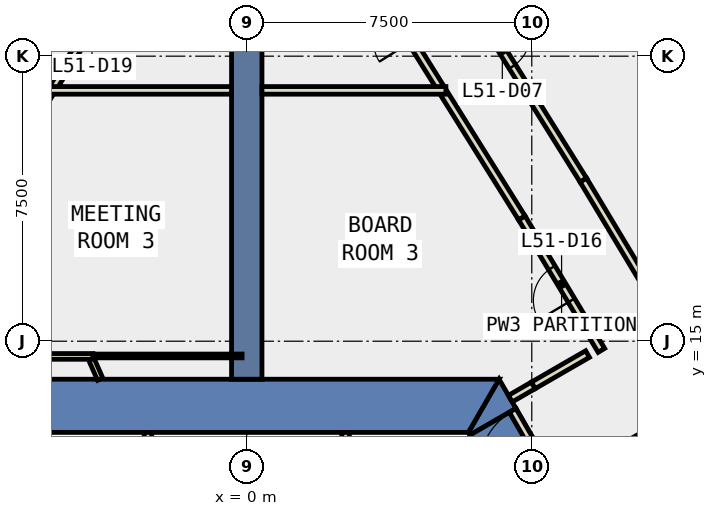
"""IFC4 building model, lengths in metres.
Left out: names, types, materials, properties, quantities, classifications, styles, units other than length and angle.
Written with IfcOpenShell. Run it as: python <this file> out.ifc"""

import sys

from ifc_helpers import new_model, si_unit, direction, frame, frame_2d, origin, place, context, subcontext, project, spatial, polyline, rectangle, outline, extrude, element, fill, save


model = new_model("IFC4")
c1 = context("Model", 3, precision=1e-05, world=origin(), true_north=direction((0.0, 1.0)))
c2 = subcontext(c1, "Body", "Model", "MODEL_VIEW")
j1 = project(units=[si_unit("LENGTHUNIT", "METRE"), si_unit("PLANEANGLEUNIT", "RADIAN")], contexts=[c1])
p1 = place(None, origin())
s1 = spatial("IfcSite", under=j1, at=p1, CompositionType="ELEMENT")
p2 = place(p1, origin())
s2 = spatial("IfcBuilding", under=s1, at=p2, CompositionType="ELEMENT")
p3 = place(p2, frame((0.0, 0.0, 227.6)))
s3 = spatial("IfcBuildingStorey", under=s2, at=p3, CompositionType="ELEMENT", Elevation=227.6)
p4 = place(p3, frame((0.0, 0.0, -0.4)))
e1 = element("IfcWall", 1, at=p4, inside=s3, PredefinedType="SHEAR", context=c2, shape_type="SweptSolid", body=[
    extrude(outline(polyline([(5.871, 12.53), (7.084, 13.23), (6.64, 14.0), (5.831, 12.6), (5.871, 12.53)])), origin(), (0.0, 0.0, 1.0), 4.2),
])
p5 = place(p3, frame((0.0, 0.0, 3.6)))
e2 = element("IfcWall", 2, at=p5, inside=s3, PredefinedType="SHEAR", context=c2, shape_type="SweptSolid", body=[
    extrude(outline(polyline([(7.084, 13.23), (5.871, 12.53), (6.871, 10.798), (8.084, 11.498), (7.084, 13.23)])), origin(), (0.0, 0.0, 1.0), 0.2),
])
p6 = place(p3, frame((0.0, 0.0, -0.4)))
e3 = element("IfcWall", 3, at=p6, inside=s3, PredefinedType="SHEAR", context=c2, shape_type="SweptSolid", body=[
    extrude(outline(polyline([(6.64, 14.0), (-6.64, 14.0), (-5.831, 12.6), (5.831, 12.6), (6.64, 14.0)])), origin(), (0.0, 0.0, 1.0), 4.2),
])
p7 = place(p3, frame((0.0, 14.0, -0.4), z_axis=(0.0, 0.0, 1.0), x_axis=(0.0, 1.0, 0.0)))
e4 = element("IfcWall", 4, at=p7, inside=s3, PredefinedType="SHEAR", context=c2, shape_type="SweptSolid", body=[
    extrude(rectangle(XDim=9.0, YDim=0.8, at=frame_2d((4.5, 0.0))), origin(), (0.0, 0.0, 1.0), 4.2),
])
p8 = place(p3, frame((13.41, 22.614, 0.0), z_axis=(0.0, 0.0, 1.0), x_axis=(-0.530037467052, 0.847974223383, 0.0)))
e5 = element("IfcWall", 5, at=p8, inside=s3, PredefinedType="STANDARD", context=c2, shape_type="SweptSolid", body=[
    extrude(rectangle(XDim=7.405, YDim=0.3, at=frame_2d((3.702, 0.0))), origin(), (0.0, 0.0, 1.0), 3.8),
])
p9 = place(p8, frame((0.651, 0.0, 0.9)))
e6 = element("IfcOpeningElement", 6, at=p9, cuts=e5, PredefinedType="OPENING", context=c2, shape_type="SweptSolid", body=[
    extrude(rectangle(XDim=2.4, YDim=2.6, at=frame_2d((1.2, 1.3))), frame((0.0, 0.16, 0.0), z_axis=(0.0, -1.0, 0.0), x_axis=(1.0, 0.0, 0.0)), (0.0, 0.0, 1.0), 0.32),
])
p10 = place(p8, frame((4.354, 0.0, 0.9)))
e7 = element("IfcOpeningElement", 7, at=p10, cuts=e5, PredefinedType="OPENING", context=c2, shape_type="SweptSolid", body=[
    extrude(rectangle(XDim=2.4, YDim=2.6, at=frame_2d((1.2, 1.3))), frame((0.0, 0.16, 0.0), z_axis=(0.0, -1.0, 0.0), x_axis=(1.0, 0.0, 0.0)), (0.0, 0.0, 1.0), 0.32),
])
p11 = place(p3, frame((10.706, 12.666, 0.0), z_axis=(0.0, 0.0, 1.0), x_axis=(-0.865862892194, -0.50028137275, 0.0)))
e8 = element("IfcWall", 8, at=p11, inside=s3, PredefinedType="PARTITIONING", context=c2, shape_type="SweptSolid", body=[
    extrude(rectangle(XDim=2.155, YDim=0.2, at=frame_2d((1.078, 0.0))), origin(), (0.0, 0.0, 1.0), 3.8),
])
p12 = place(p3, frame((6.935, 13.488, 0.0), z_axis=(0.0, 0.0, 1.0), x_axis=(0.866022890907, 0.500004352405, 0.0)))
e9 = element("IfcWall", 9, at=p12, inside=s3, PredefinedType="PARTITIONING", context=c2, shape_type="SweptSolid", body=[
    extrude(rectangle(XDim=0.7, YDim=0.2, at=frame_2d((0.35, 0.0))), origin(), (0.0, 0.0, 1.0), 2.4),
])
p13 = place(p3, frame((9.332, 14.759, 0.0), z_axis=(0.0, 0.0, 1.0), x_axis=(-0.514989912292, 0.857196237881, 0.0)))
e10 = element("IfcWall", 10, at=p13, inside=s3, PredefinedType="PARTITIONING", context=c2, shape_type="SweptSolid", body=[
    extrude(rectangle(XDim=4.068, YDim=0.2, at=frame_2d((2.034, 0.0))), origin(), (0.0, 0.0, 1.0), 3.8),
])
p14 = place(p13, frame((1.534, 0.0, 0.0)))
e11 = element("IfcOpeningElement", 11, at=p14, cuts=e10, PredefinedType="OPENING", context=c2, shape_type="SweptSolid", body=[
    extrude(rectangle(XDim=1.0, YDim=2.1, at=frame_2d((0.5, 1.05))), frame((0.0, 0.11, 0.0), z_axis=(0.0, -1.0, 0.0), x_axis=(1.0, 0.0, 0.0)), (0.0, 0.0, 1.0), 0.22),
])
for number, where, z_axis, x_axis in (
    (12, (7.237, 18.246, 0.0), (0.0, 0.0, 1.0), (-0.53, 0.848, 0.0)),
    (13, (-5.193, 21.515, 0.0), (0.0, 0.0, 1.0), (-0.53, -0.848, 0.0)),
):
    element("IfcWall", number, at=place(p3, frame(where, z_axis=z_axis, x_axis=x_axis)), inside=s3, PredefinedType="PARTITIONING", context=c2, shape_type="SweptSolid", body=[
        extrude(rectangle(XDim=3.855, YDim=0.2, at=frame_2d((1.928, 0.0))), origin(), (0.0, 0.0, 1.0), 3.8),
    ])
p15 = place(p3, frame((5.087, 21.685, 0.0), z_axis=(0.0, 0.0, 1.0), x_axis=(-0.529998940003, 0.847998304005, 0.0)))
e14 = element("IfcWall", 14, at=p15, inside=s3, PredefinedType="PARTITIONING", context=c2, shape_type="SweptSolid", body=[
    extrude(rectangle(XDim=3.83, YDim=0.2, at=frame_2d((1.915, 0.0))), origin(), (0.0, 0.0, 1.0), 3.8),
])
p16 = place(p15, frame((1.416, 0.0, 0.0)))
e15 = element("IfcOpeningElement", 15, at=p16, cuts=e14, PredefinedType="OPENING", context=c2, shape_type="SweptSolid", body=[
    extrude(rectangle(XDim=1.0, YDim=2.1, at=frame_2d((0.5, 1.05))), frame((0.0, 0.11, 0.0), z_axis=(0.0, -1.0, 0.0), x_axis=(1.0, 0.0, 0.0)), (0.0, 0.0, 1.0), 0.22),
])
p17 = place(p3, frame((-3.057, 24.933, 0.0), z_axis=(0.0, 0.0, 1.0), x_axis=(-0.529998940003, -0.847998304005, 0.0)))
e16 = element("IfcWall", 16, at=p17, inside=s3, PredefinedType="PARTITIONING", context=c2, shape_type="SweptSolid", body=[
    extrude(rectangle(XDim=3.83, YDim=0.2, at=frame_2d((1.915, 0.0))), origin(), (0.0, 0.0, 1.0), 3.8),
])
p18 = place(p17, frame((1.416, 0.0, 0.0)))
e17 = element("IfcOpeningElement", 17, at=p18, cuts=e16, PredefinedType="OPENING", context=c2, shape_type="SweptSolid", body=[
    extrude(rectangle(XDim=1.0, YDim=2.1, at=frame_2d((0.5, 1.05))), frame((0.0, 0.11, 0.0), z_axis=(0.0, -1.0, 0.0), x_axis=(1.0, 0.0, 0.0)), (0.0, 0.0, 1.0), 0.22),
])
p19 = place(p3, frame((4.593, 26.061, 0.0), z_axis=(0.0, 0.0, 1.0), x_axis=(0.530012579093, -0.847989779421, 0.0)))
e18 = element("IfcWall", 18, at=p19, inside=s3, PredefinedType="PARTITIONING", context=c2, shape_type="SweptSolid", body=[
    extrude(rectangle(XDim=8.045, YDim=0.2, at=frame_2d((4.022, 0.0))), origin(), (0.0, 0.0, 1.0), 3.8),
])
p20 = place(p19, frame((3.522, 0.0, 0.0)))
e19 = element("IfcOpeningElement", 19, at=p20, cuts=e18, PredefinedType="OPENING", context=c2, shape_type="SweptSolid", body=[
    extrude(rectangle(XDim=1.0, YDim=2.1, at=frame_2d((0.5, 1.05))), frame((0.0, 0.11, 0.0), z_axis=(0.0, -1.0, 0.0), x_axis=(1.0, 0.0, 0.0)), (0.0, 0.0, 1.0), 0.22),
])
p21 = place(p3, frame((8.857, 19.239, 0.0), z_axis=(0.0, 0.0, 1.0), x_axis=(0.514953174362, -0.857218308376, 0.0)))
e20 = element("IfcWall", 20, at=p21, inside=s3, PredefinedType="PARTITIONING", context=c2, shape_type="SweptSolid", body=[
    extrude(rectangle(XDim=4.002, YDim=0.2, at=frame_2d((2.001, 0.0))), origin(), (0.0, 0.0, 1.0), 3.8),
])
p22 = place(p3, frame((-8.896, 19.176, 0.0), z_axis=(0.0, 0.0, 1.0), x_axis=(0.529985425286, 0.848006750553, 0.0)))
e21 = element("IfcWall", 21, at=p22, inside=s3, PredefinedType="PARTITIONING", context=c2, shape_type="SweptSolid", body=[
    extrude(rectangle(XDim=8.119, YDim=0.2, at=frame_2d((4.06, 0.0))), origin(), (0.0, 0.0, 1.0), 3.8),
])
p23 = place(p22, frame((3.56, 0.0, 0.0)))
e22 = element("IfcOpeningElement", 22, at=p23, cuts=e21, PredefinedType="OPENING", context=c2, shape_type="SweptSolid", body=[
    extrude(rectangle(XDim=1.0, YDim=2.1, at=frame_2d((0.5, 1.05))), frame((0.0, 0.11, 0.0), z_axis=(0.0, -1.0, 0.0), x_axis=(1.0, 0.0, 0.0)), (0.0, 0.0, 1.0), 0.22),
])
p24 = place(p3, frame((-2.6, 10.8, 0.0), z_axis=(0.0, 0.0, 1.0), x_axis=(0.0, 1.0, 0.0)))
e23 = element("IfcWall", 23, at=p24, inside=s3, PredefinedType="PARTITIONING", context=c2, shape_type="SweptSolid", body=[
    extrude(rectangle(XDim=1.8, YDim=0.2, at=frame_2d((0.9, 0.0))), origin(), (0.0, 0.0, 1.0), 3.8),
])
p25 = place(p24, frame((0.4, 0.0, 0.0)))
e24 = element("IfcOpeningElement", 24, at=p25, cuts=e23, PredefinedType="OPENING", context=c2, shape_type="SweptSolid", body=[
    extrude(rectangle(XDim=0.9, YDim=2.1, at=frame_2d((0.45, 1.05))), frame((0.0, 0.11, 0.0), z_axis=(0.0, -1.0, 0.0), x_axis=(1.0, 0.0, 0.0)), (0.0, 0.0, 1.0), 0.22),
])
p26 = place(p3, frame((2.6, 12.6, 0.0), z_axis=(0.0, 0.0, 1.0), x_axis=(0.0, -1.0, 0.0)))
e25 = element("IfcWall", 25, at=p26, inside=s3, PredefinedType="PARTITIONING", context=c2, shape_type="SweptSolid", body=[
    extrude(rectangle(XDim=1.8, YDim=0.2, at=frame_2d((0.9, 0.0))), origin(), (0.0, 0.0, 1.0), 3.8),
])
p27 = place(p3, frame((-3.857, 14.0, 0.0), z_axis=(0.0, 0.0, 1.0), x_axis=(-0.403443407317, 0.915004599493, 0.0)))
e26 = element("IfcWall", 26, at=p27, inside=s3, PredefinedType="PARTITIONING", context=c2, shape_type="SweptSolid", body=[
    extrude(rectangle(XDim=0.58, YDim=0.15, at=frame_2d((0.29, 0.0))), origin(), (0.0, 0.0, 1.0), 3.8),
])
p28 = place(p3, frame((-4.047, 14.6, 0.0), z_axis=(0.0, 0.0, 1.0), x_axis=(-1.0, 0.0, 0.0)))
e27 = element("IfcWall", 27, at=p28, inside=s3, PredefinedType="PARTITIONING", context=c2, shape_type="SweptSolid", body=[
    extrude(rectangle(XDim=5.48, YDim=0.15, at=frame_2d((2.74, 0.0))), origin(), (0.0, 0.0, 1.0), 3.8),
])
p29 = place(p3, frame((-4.047, 14.612, 0.0), z_axis=(0.0, 0.0, 1.0), x_axis=(1.0, 0.0, 0.0)))
e28 = element("IfcWall", 28, at=p29, inside=s3, PredefinedType="PARTITIONING", context=c2, shape_type="SweptSolid", body=[
    extrude(rectangle(XDim=3.924, YDim=0.1, at=frame_2d((1.962, 0.0))), origin(), (0.0, 0.0, 1.0), 3.8),
])
for number, where, z_axis, x_axis in (
    (29, (0.4, 21.6, 0.0), (0.0, 0.0, 1.0), (1.0, 0.0, 0.0)),
    (30, (-5.24, 21.6, 0.0), (0.0, 0.0, 1.0), (1.0, 0.0, 0.0)),
):
    element("IfcWall", number, at=place(p3, frame(where, z_axis=z_axis, x_axis=x_axis)), inside=s3, PredefinedType="PARTITIONING", context=c2, shape_type="SweptSolid", body=[
        extrude(rectangle(XDim=4.84, YDim=0.2, at=frame_2d((2.42, 0.0))), origin(), (0.0, 0.0, 1.0), 3.8),
    ])
p30 = place(p3, frame((7.997, 11.448, 0.0), z_axis=(0.0, 0.0, 1.0), x_axis=(-0.50002537861, 0.866010750942, 0.0)))
e31 = element("IfcWall", 31, at=p30, inside=s3, PredefinedType="PARTITIONING", context=c2, shape_type="SweptSolid", body=[
    extrude(rectangle(XDim=2.0, YDim=0.2, at=frame_2d((1.0, 0.0))), origin(), (0.0, 0.0, 1.0), 2.4),
])
p31 = place(p30, frame((0.19, 0.0, 0.0)))
e32 = element("IfcOpeningElement", 32, at=p31, cuts=e31, PredefinedType="OPENING", context=c2, shape_type="SweptSolid", body=[
    extrude(rectangle(XDim=1.8, YDim=2.1, at=frame_2d((0.9, 1.05))), frame((0.0, 0.11, 0.0), z_axis=(0.0, -1.0, 0.0), x_axis=(1.0, 0.0, 0.0)), (0.0, 0.0, 1.0), 0.22),
])
p32 = place(p3, frame((7.541, 13.838, 0.0), z_axis=(0.0, 0.0, 1.0), x_axis=(0.86593636949, 0.500154180222, 0.0)))
e33 = element("IfcWall", 33, at=p32, inside=s3, PredefinedType="PARTITIONING", context=c2, shape_type="SweptSolid", body=[
    extrude(rectangle(XDim=1.648, YDim=0.2, at=frame_2d((0.824, 0.0))), origin(), (0.0, 0.0, 1.0), 3.8),
])
p33 = place(p20, origin())
e34 = element("IfcDoor", 34, at=p33, inside=s3, OperationType="SINGLE_SWING_LEFT", PredefinedType="DOOR", context=c2, shape_type="SweptSolid", body=[
    extrude(rectangle(XDim=1.0, YDim=2.1, at=frame_2d((0.5, 1.05))), frame((0.0, 0.025, 0.0), z_axis=(0.0, -1.0, 0.0), x_axis=(1.0, 0.0, 0.0)), (0.0, 0.0, 1.0), 0.05),
])
fill(e19, e34)
p34 = place(p14, origin())
e35 = element("IfcDoor", 35, at=p34, inside=s3, OperationType="SINGLE_SWING_LEFT", PredefinedType="DOOR", context=c2, shape_type="SweptSolid", body=[
    extrude(rectangle(XDim=1.0, YDim=2.1, at=frame_2d((0.5, 1.05))), frame((0.0, 0.025, 0.0), z_axis=(0.0, -1.0, 0.0), x_axis=(1.0, 0.0, 0.0)), (0.0, 0.0, 1.0), 0.05),
])
fill(e11, e35)
p35 = place(p31, origin())
e36 = element("IfcDoor", 36, at=p35, inside=s3, OperationType="DOUBLE_DOOR_SINGLE_SWING", PredefinedType="DOOR", context=c2, shape_type="SweptSolid", body=[
    extrude(rectangle(XDim=1.8, YDim=2.1, at=frame_2d((0.9, 1.05))), frame((0.0, 0.025, 0.0), z_axis=(0.0, -1.0, 0.0), x_axis=(1.0, 0.0, 0.0)), (0.0, 0.0, 1.0), 0.05),
])
fill(e32, e36)
save(model, sys.argv[1])
